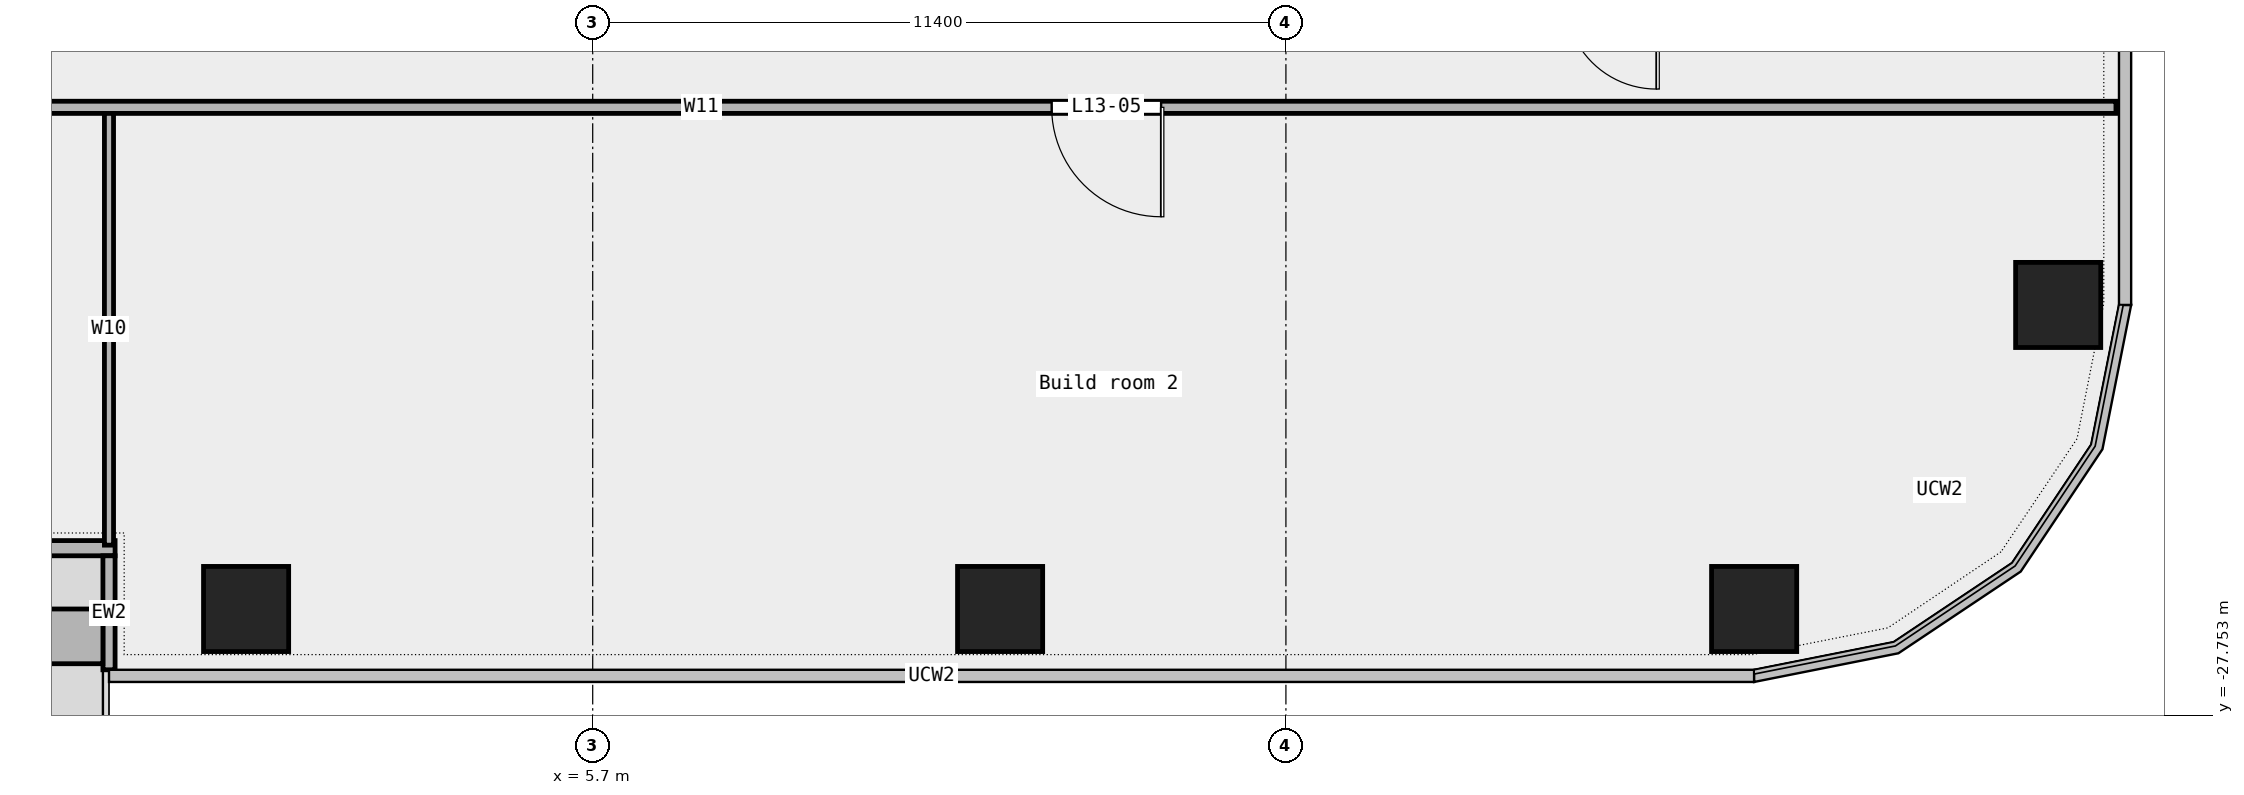
"""IFC4 building model, lengths in metres.
Left out: names, types, materials, properties, quantities, classifications, styles, units other than length and angle.
Written with IfcOpenShell. Run it as: python <this file> out.ifc"""

import sys

from ifc_helpers import new_model, si_unit, direction, frame, frame_2d, origin, origin_2d, place, context, subcontext, project, spatial, rectangle, extrude, element, fill, save


model = new_model("IFC4")
c1 = context("Model", 3, precision=1e-05, world=origin(), true_north=direction((0.0, 1.0)))
c2 = subcontext(c1, "Body", "Model", "MODEL_VIEW")
j1 = project(units=[si_unit("LENGTHUNIT", "METRE"), si_unit("PLANEANGLEUNIT", "RADIAN")], contexts=[c1])
p1 = place(None, origin())
s1 = spatial("IfcSite", under=j1, at=p1, CompositionType="ELEMENT")
p2 = place(p1, origin())
s2 = spatial("IfcBuilding", under=s1, at=p2, CompositionType="ELEMENT")
p3 = place(p2, frame((0.0, 0.0, 69.4)))
s3 = spatial("IfcBuildingStorey", under=s2, at=p3, CompositionType="ELEMENT", Elevation=69.4)
for number, where, z_axis, x_axis in (
    (1, (0.0, -26.0, 0.0), (0.0, 0.0, 1.0), (1.0, 0.0, 0.0)),
    (2, (12.4, -26.0, 0.0), (0.0, 0.0, 1.0), (1.0, 0.0, 0.0)),
    (3, (24.8, -26.0, 0.0), (0.0, 0.0, 1.0), (1.0, 0.0, 0.0)),
    (4, (29.8, -21.0, 0.0), (0.0, 0.0, 1.0), (1.0, 0.0, 0.0)),
):
    element("IfcColumn", number, at=place(p3, frame(where, z_axis=z_axis, x_axis=x_axis)), inside=s3, PredefinedType="COLUMN", context=c2, shape_type="SweptSolid", body=[
        extrude(rectangle(XDim=1.4, YDim=1.4, at=origin_2d()), origin(), (0.0, 0.0, 1.0), 4.35),
    ])
p4 = place(p3, frame((-15.882, -25.0, 0.0), z_axis=(0.0, 0.0, 1.0), x_axis=(1.0, 0.0, 0.0)))
e5 = element("IfcWall", 5, at=p4, inside=s3, PredefinedType="STANDARD", context=c2, shape_type="SweptSolid", body=[
    extrude(rectangle(XDim=13.727, YDim=0.25, at=frame_2d((6.864, 0.0))), origin(), (0.0, 0.0, 1.0), 4.35),
])
p5 = place(p4, frame((1.0, 0.0, 0.45)))
e6 = element("IfcOpeningElement", 6, at=p5, cuts=e5, PredefinedType="OPENING", context=c2, shape_type="SweptSolid", body=[
    extrude(rectangle(XDim=1.5, YDim=3.0, at=frame_2d((0.75, 1.5))), frame((0.0, 0.137, 0.0), z_axis=(0.0, -1.0, 0.0), x_axis=(1.0, 0.0, 0.0)), (0.0, 0.0, 1.0), 0.274),
])
p6 = place(p4, frame((6.0, 0.0, 0.0)))
e7 = element("IfcOpeningElement", 7, at=p6, cuts=e5, PredefinedType="OPENING", context=c2, shape_type="SweptSolid", body=[
    extrude(rectangle(XDim=1.8, YDim=2.4, at=frame_2d((0.9, 1.2))), frame((0.0, 0.137, 0.0), z_axis=(0.0, -1.0, 0.0), x_axis=(1.0, 0.0, 0.0)), (0.0, 0.0, 1.0), 0.274),
])
p7 = place(p4, frame((10.5, 0.0, 0.45)))
e8 = element("IfcOpeningElement", 8, at=p7, cuts=e5, PredefinedType="OPENING", context=c2, shape_type="SweptSolid", body=[
    extrude(rectangle(XDim=1.5, YDim=3.0, at=frame_2d((0.75, 1.5))), frame((0.0, 0.137, 0.0), z_axis=(0.0, -1.0, 0.0), x_axis=(1.0, 0.0, 0.0)), (0.0, 0.0, 1.0), 0.274),
])
p8 = place(p3, frame((-2.255, -27.0, 0.0), z_axis=(0.0, 0.0, 1.0), x_axis=(0.0, 1.0, 0.0)))
e9 = element("IfcWall", 9, at=p8, inside=s3, PredefinedType="STANDARD", context=c2, shape_type="SweptSolid", body=[
    extrude(rectangle(XDim=1.875, YDim=0.2, at=frame_2d((0.938, 0.0))), origin(), (0.0, 0.0, 1.0), 4.35),
])
p9 = place(p3, frame((-5.955, -26.45, 0.0), z_axis=(0.0, 0.0, 1.0), x_axis=(1.0, 0.0, 0.0)))
e10 = element("IfcWall", 10, at=p9, inside=s3, PredefinedType="STANDARD", context=c2, shape_type="SweptSolid", body=[
    extrude(rectangle(XDim=3.6, YDim=0.9, at=frame_2d((1.8, 0.0))), origin(), (0.0, 0.0, 1.0), 0.7),
])
p10 = place(p3, frame((-15.78, -17.75, 0.0), z_axis=(0.0, 0.0, 1.0), x_axis=(1.0, 0.0, 0.0)))
e11 = element("IfcWall", 11, at=p10, inside=s3, PredefinedType="PARTITIONING", context=c2, shape_type="SweptSolid", body=[
    extrude(rectangle(XDim=46.53, YDim=0.2, at=frame_2d((23.265, 0.0))), origin(), (0.0, 0.0, 1.0), 4.35),
])
p11 = place(p10, frame((29.028, 0.0, 0.0)))
e12 = element("IfcOpeningElement", 12, at=p11, cuts=e11, PredefinedType="OPENING", context=c2, shape_type="SweptSolid", body=[
    extrude(rectangle(XDim=1.8, YDim=2.1, at=frame_2d((0.9, 1.05))), frame((0.0, 0.112, 0.0), z_axis=(0.0, -1.0, 0.0), x_axis=(1.0, 0.0, 0.0)), (0.0, 0.0, 1.0), 0.224),
])
p12 = place(p10, frame((6.012, 0.0, 0.0)))
e13 = element("IfcOpeningElement", 13, at=p12, cuts=e11, PredefinedType="OPENING", context=c2, shape_type="SweptSolid", body=[
    extrude(rectangle(XDim=1.5, YDim=2.1, at=frame_2d((0.75, 1.05))), frame((0.0, 0.112, 0.0), z_axis=(0.0, -1.0, 0.0), x_axis=(1.0, 0.0, 0.0)), (0.0, 0.0, 1.0), 0.224),
])
p13 = place(p3, frame((-2.255, -24.95, 0.0), z_axis=(0.0, 0.0, 1.0), x_axis=(0.0, 1.0, 0.0)))
e14 = element("IfcWall", 14, at=p13, inside=s3, PredefinedType="PARTITIONING", context=c2, shape_type="SweptSolid", body=[
    extrude(rectangle(XDim=7.1, YDim=0.15, at=frame_2d((3.55, 0.0))), origin(), (0.0, 0.0, 1.0), 4.35),
])
p14 = place(p11, origin())
e15 = element("IfcDoor", 15, at=p14, inside=s3, OperationType="DOUBLE_DOOR_SINGLE_SWING", PredefinedType="DOOR", context=c2, shape_type="SweptSolid", body=[
    extrude(rectangle(XDim=1.8, YDim=2.1, at=frame_2d((0.9, 1.05))), frame((0.0, 0.025, 0.0), z_axis=(0.0, -1.0, 0.0), x_axis=(1.0, 0.0, 0.0)), (0.0, 0.0, 1.0), 0.05),
])
fill(e12, e15)
save(model, sys.argv[1])
